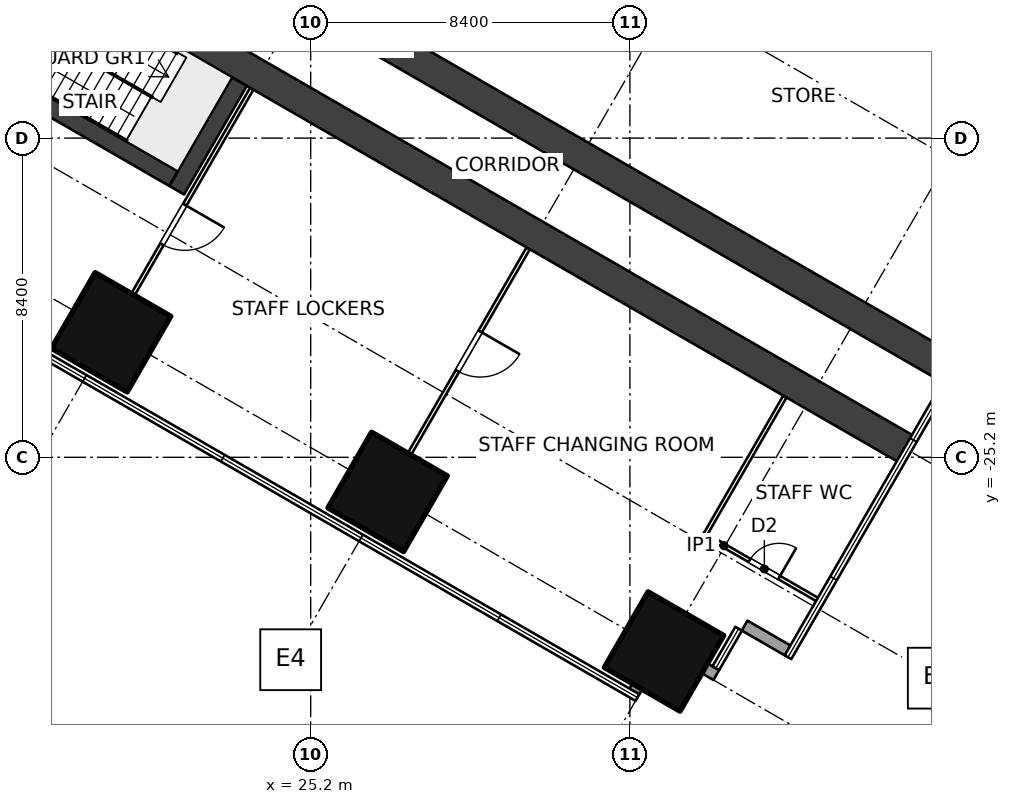
"""IFC4 building model, lengths in metres.
Left out: names, types, materials, properties, quantities, classifications, styles, units other than length and angle.
Written with IfcOpenShell. Run it as: python <this file> out.ifc"""

import sys

from ifc_helpers import new_model, si_unit, direction, frame, frame_2d, origin, origin_2d, place, context, subcontext, project, spatial, rectangle, extrude, element, fill, save


model = new_model("IFC4")
c1 = context("Model", 3, precision=1e-05, world=origin(), true_north=direction((0.0, 1.0)))
c2 = subcontext(c1, "Body", "Model", "MODEL_VIEW")
j1 = project(units=[si_unit("LENGTHUNIT", "METRE"), si_unit("PLANEANGLEUNIT", "RADIAN")], contexts=[c1])
p1 = place(None, origin())
s1 = spatial("IfcSite", under=j1, at=p1, CompositionType="ELEMENT")
p2 = place(p1, origin())
s2 = spatial("IfcBuilding", under=s1, at=p2, CompositionType="ELEMENT")
p3 = place(p2, frame((0.0, 0.0, 21.0)))
s3 = spatial("IfcBuildingStorey", under=s2, at=p3, CompositionType="ELEMENT", Elevation=21.0)
for number, where, z_axis, x_axis in (
    (1, (19.949, -21.91, 0.0), (0.0, 0.0, 1.0), (-0.5, -0.866, 0.0)),
    (2, (27.224, -26.11, 0.0), (0.0, 0.0, 1.0), (-0.5, -0.866, 0.0)),
    (3, (34.499, -30.31, 0.0), (0.0, 0.0, 1.0), (-0.5, -0.866, 0.0)),
):
    element("IfcColumn", number, at=place(p3, frame(where, z_axis=z_axis, x_axis=x_axis)), inside=s3, PredefinedType="COLUMN", context=c2, shape_type="SweptSolid", body=[
        extrude(rectangle(XDim=2.3, YDim=2.3, at=origin_2d()), origin(), (0.0, 0.0, 1.0), 5.0),
    ])
p4 = place(p3, frame((10.11, -4.451, 0.0), z_axis=(0.0, 0.0, 1.0), x_axis=(0.866023348156, -0.500003560437, 0.0)))
e4 = element("IfcWall", 4, at=p4, inside=s3, PredefinedType="SHEAR", context=c2, shape_type="SweptSolid", body=[
    extrude(rectangle(XDim=36.888, YDim=0.8, at=frame_2d((18.444, 0.0))), origin(), (0.0, 0.0, 1.0), 5.0),
])
p5 = place(p4, frame((1.35, 0.0, 0.0)))
e5 = element("IfcOpeningElement", 5, at=p5, cuts=e4, PredefinedType="OPENING", context=c2, shape_type="SweptSolid", body=[
    extrude(rectangle(XDim=1.2, YDim=2.1, at=frame_2d((0.6, 1.05))), frame((0.0, 0.41, 0.0), z_axis=(0.0, -1.0, 0.0), x_axis=(1.0, 0.0, 0.0)), (0.0, 0.0, 1.0), 0.82),
])
p6 = place(p3, frame((8.91, -6.53, 0.0), z_axis=(0.0, 0.0, 1.0), x_axis=(0.866026214035, -0.499998596603, 0.0)))
e6 = element("IfcWall", 6, at=p6, inside=s3, PredefinedType="SHEAR", context=c2, shape_type="SweptSolid", body=[
    extrude(rectangle(XDim=36.888, YDim=0.8, at=frame_2d((18.444, 0.0))), origin(), (0.0, 0.0, 1.0), 5.0),
])
p7 = place(p6, frame((10.0, 0.0, 0.0)))
e7 = element("IfcOpeningElement", 7, at=p7, cuts=e6, PredefinedType="OPENING", context=c2, shape_type="SweptSolid", body=[
    extrude(rectangle(XDim=1.0, YDim=2.1, at=frame_2d((0.5, 1.05))), frame((0.0, 0.41, 0.0), z_axis=(0.0, -1.0, 0.0), x_axis=(1.0, 0.0, 0.0)), (0.0, 0.0, 1.0), 0.82),
])
p8 = place(p6, frame((2.85, 0.0, 0.0)))
e8 = element("IfcOpeningElement", 8, at=p8, cuts=e6, PredefinedType="OPENING", context=c2, shape_type="SweptSolid", body=[
    extrude(rectangle(XDim=1.2, YDim=2.1, at=frame_2d((0.6, 1.05))), frame((0.0, 0.41, 0.0), z_axis=(0.0, -1.0, 0.0), x_axis=(1.0, 0.0, 0.0)), (0.0, 0.0, 1.0), 0.82),
])
p9 = place(p3, frame((37.753, -30.283, 0.0), z_axis=(0.0, 0.0, 1.0), x_axis=(-0.866101796549, 0.4998676605, 0.0)))
e9 = element("IfcWall", 9, at=p9, inside=s3, PredefinedType="SOLIDWALL", context=c2, shape_type="SweptSolid", body=[
    extrude(rectangle(XDim=1.31, YDim=0.3, at=frame_2d((0.655, 0.0))), origin(), (0.0, 0.0, 1.0), 4.6),
])
p10 = place(p3, frame((35.873, -30.93, 0.0), z_axis=(0.0, 0.0, 1.0), x_axis=(-0.865939549016, 0.500148675346, 0.0)))
e10 = element("IfcWall", 10, at=p10, inside=s3, PredefinedType="SOLIDWALL", context=c2, shape_type="SweptSolid", body=[
    extrude(rectangle(XDim=0.347, YDim=0.3, at=frame_2d((0.174, 0.0))), origin(), (0.0, 0.0, 1.0), 4.6),
])
p11 = place(p3, frame((34.219, -30.495, 0.0), z_axis=(0.0, 0.0, 1.0), x_axis=(-0.499953773667, -0.866052090925, 0.0)))
e11 = element("IfcWall", 11, at=p11, inside=s3, PredefinedType="SOLIDWALL", context=c2, shape_type="SweptSolid", body=[
    extrude(rectangle(XDim=1.005, YDim=0.3, at=frame_2d((0.502, 0.0))), origin(), (0.0, 0.0, 1.0), 4.6),
])
p12 = place(p3, frame((23.649, -15.501, 0.0), z_axis=(0.0, 0.0, 1.0), x_axis=(-0.500004234368, -0.866022959057, 0.0)))
e12 = element("IfcWall", 12, at=p12, inside=s3, PredefinedType="PARTITIONING", context=c2, shape_type="SweptSolid", body=[
    extrude(rectangle(XDim=6.25, YDim=0.1, at=frame_2d((3.125, 0.0))), origin(), (0.0, 0.0, 1.0), 2.8),
])
p13 = place(p12, frame((3.525, 0.0, 0.0)))
e13 = element("IfcOpeningElement", 13, at=p13, cuts=e12, PredefinedType="OPENING", context=c2, shape_type="SweptSolid", body=[
    extrude(rectangle(XDim=1.2, YDim=2.1, at=frame_2d((0.6, 1.05))), frame((0.0, 0.06, 0.0), z_axis=(0.0, -1.0, 0.0), x_axis=(1.0, 0.0, 0.0)), (0.0, 0.0, 1.0), 0.12),
])
p14 = place(p3, frame((30.924, -19.701, 0.0), z_axis=(0.0, 0.0, 1.0), x_axis=(-0.500004234368, -0.866022959057, 0.0)))
e14 = element("IfcWall", 14, at=p14, inside=s3, PredefinedType="PARTITIONING", context=c2, shape_type="SweptSolid", body=[
    extrude(rectangle(XDim=6.25, YDim=0.1, at=frame_2d((3.125, 0.0))), origin(), (0.0, 0.0, 1.0), 2.8),
])
p15 = place(p14, frame((2.525, 0.0, 0.0)))
e15 = element("IfcOpeningElement", 15, at=p15, cuts=e14, PredefinedType="OPENING", context=c2, shape_type="SweptSolid", body=[
    extrude(rectangle(XDim=1.2, YDim=2.1, at=frame_2d((0.6, 1.05))), frame((0.0, 0.06, 0.0), z_axis=(0.0, -1.0, 0.0), x_axis=(1.0, 0.0, 0.0)), (0.0, 0.0, 1.0), 0.12),
])
p16 = place(p3, frame((35.536, -27.214, 0.0), z_axis=(0.0, 0.0, 1.0), x_axis=(0.866002528137, -0.500039619691, 0.0)))
e16 = element("IfcWall", 16, at=p16, inside=s3, PredefinedType="PARTITIONING", context=c2, shape_type="SweptSolid", body=[
    extrude(rectangle(XDim=3.487, YDim=0.1, at=frame_2d((1.744, 0.0))), origin(), (0.0, 0.0, 1.0), 4.6),
])
p17 = place(p16, frame((1.4, 0.0, 0.0)))
e17 = element("IfcOpeningElement", 17, at=p17, cuts=e16, PredefinedType="OPENING", context=c2, shape_type="SweptSolid", body=[
    extrude(rectangle(XDim=0.9, YDim=2.1, at=frame_2d((0.45, 1.05))), frame((0.0, 0.06, 0.0), z_axis=(0.0, -1.0, 0.0), x_axis=(1.0, 0.0, 0.0)), (0.0, 0.0, 1.0), 0.12),
])
p18 = place(p3, frame((37.679, -23.601, 0.0), z_axis=(0.0, 0.0, 1.0), x_axis=(-0.499994284652, -0.866028703517, 0.0)))
e18 = element("IfcWall", 18, at=p18, inside=s3, PredefinedType="PARTITIONING", context=c2, shape_type="SweptSolid", body=[
    extrude(rectangle(XDim=4.25, YDim=0.1, at=frame_2d((2.125, 0.0))), origin(), (0.0, 0.0, 1.0), 2.8),
])
p19 = place(p3, frame((23.324, -15.314, 0.0), z_axis=(0.0, 0.0, 1.0), x_axis=(-0.499974350878, -0.866040211805, 0.0)))
e19 = element("IfcWall", 19, at=p19, inside=s3, PredefinedType="SOLIDWALL", context=c2, shape_type="SweptSolid", body=[
    extrude(rectangle(XDim=3.3, YDim=0.45, at=frame_2d((1.65, 0.0))), origin(), (0.0, 0.0, 1.0), 5.0),
])
p20 = place(p3, frame((15.616, -14.415, 0.0), z_axis=(0.0, 0.0, 1.0), x_axis=(0.866028853923, -0.499994024137, 0.0)))
e20 = element("IfcWall", 20, at=p20, inside=s3, PredefinedType="SOLIDWALL", context=c2, shape_type="SweptSolid", body=[
    extrude(rectangle(XDim=6.9, YDim=0.45, at=frame_2d((3.45, 0.0))), origin(), (0.0, 0.0, 1.0), 5.0),
])
p21 = place(p13, origin())
e21 = element("IfcDoor", 21, at=p21, inside=s3, OperationType="DOUBLE_SWING_LEFT", PredefinedType="DOOR", context=c2, shape_type="SweptSolid", body=[
    extrude(rectangle(XDim=1.2, YDim=2.1, at=frame_2d((0.6, 1.05))), frame((0.0, 0.025, 0.0), z_axis=(0.0, -1.0, 0.0), x_axis=(1.0, 0.0, 0.0)), (0.0, 0.0, 1.0), 0.05),
])
fill(e13, e21)
p22 = place(p15, origin())
e22 = element("IfcDoor", 22, at=p22, inside=s3, OperationType="DOUBLE_SWING_LEFT", PredefinedType="DOOR", context=c2, shape_type="SweptSolid", body=[
    extrude(rectangle(XDim=1.2, YDim=2.1, at=frame_2d((0.6, 1.05))), frame((0.0, 0.025, 0.0), z_axis=(0.0, -1.0, 0.0), x_axis=(1.0, 0.0, 0.0)), (0.0, 0.0, 1.0), 0.05),
])
fill(e15, e22)
p23 = place(p17, origin())
e23 = element("IfcDoor", 23, at=p23, inside=s3, OperationType="SINGLE_SWING_RIGHT", PredefinedType="DOOR", context=c2, shape_type="SweptSolid", body=[
    extrude(rectangle(XDim=0.9, YDim=2.1, at=frame_2d((0.45, 1.05))), frame((0.0, 0.025, 0.0), z_axis=(0.0, -1.0, 0.0), x_axis=(1.0, 0.0, 0.0)), (0.0, 0.0, 1.0), 0.05),
])
fill(e17, e23)
save(model, sys.argv[1])
